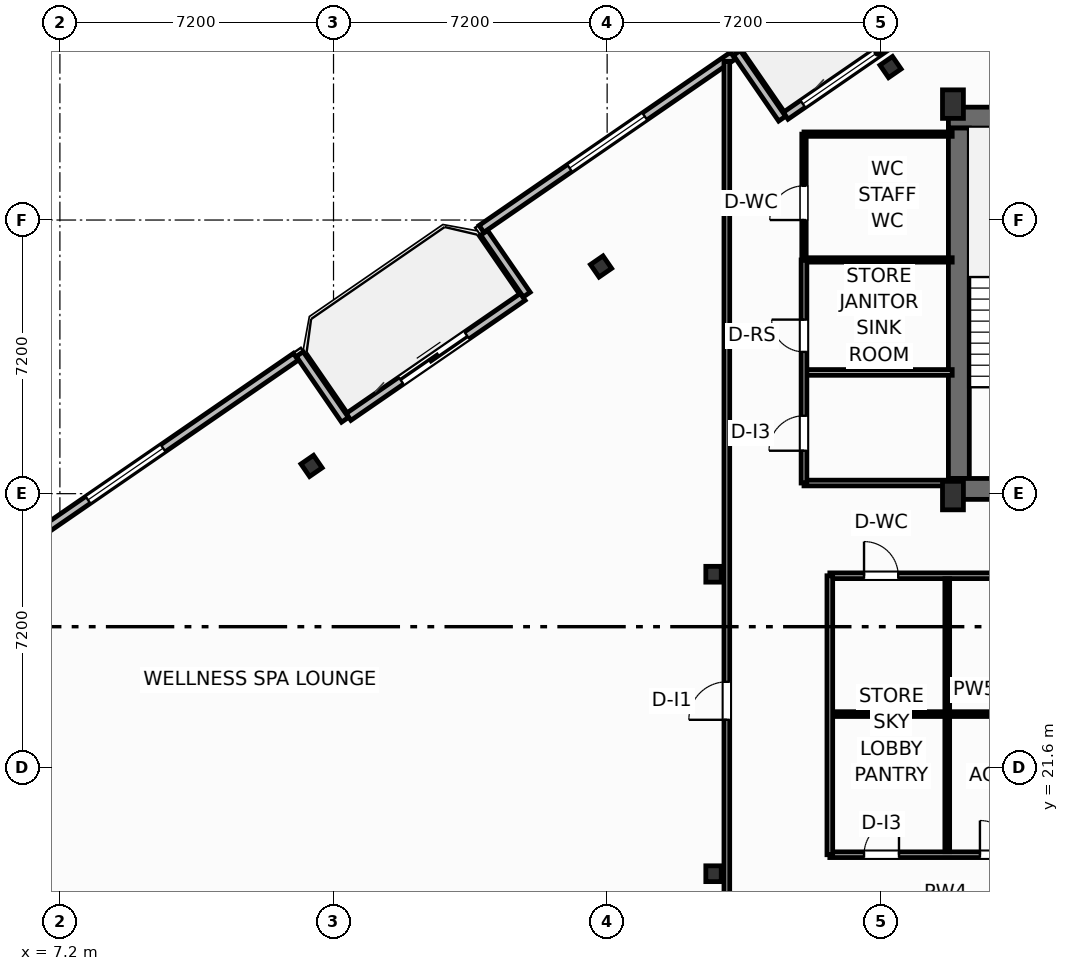
"""IFC4 building model, lengths in metres.
Left out: names, types, materials, properties, quantities, classifications, styles, units other than length and angle.
Written with IfcOpenShell. Run it as: python <this file> out.ifc"""

import sys

from ifc_helpers import new_model, si_unit, direction, frame, frame_2d, origin, origin_2d, place, context, subcontext, project, spatial, rectangle, i_section, extrude, element, fill, save


model = new_model("IFC4")
c1 = context("Model", 3, precision=1e-05, world=origin(), true_north=direction((0.0, 1.0)))
c2 = subcontext(c1, "Body", "Model", "MODEL_VIEW")
j1 = project(units=[si_unit("LENGTHUNIT", "METRE"), si_unit("PLANEANGLEUNIT", "RADIAN")], contexts=[c1])
p1 = place(None, origin())
s1 = spatial("IfcSite", under=j1, at=p1, CompositionType="ELEMENT")
p2 = place(p1, origin())
s2 = spatial("IfcBuilding", under=s1, at=p2, CompositionType="ELEMENT")
p3 = place(p2, frame((0.0, 0.0, 284.1)))
s3 = spatial("IfcBuildingStorey", under=s2, at=p3, CompositionType="ELEMENT", Elevation=284.1)
for number, where, z_axis, x_axis in (
    (1, (30.7, 28.75, 0.0), (0.0, 0.0, 1.0), (1.0, 0.0, 0.0)),
    (2, (30.7, 39.05, 0.0), (0.0, 0.0, 1.0), (1.0, 0.0, 0.0)),
):
    element("IfcColumn", number, at=place(p3, frame(where, z_axis=z_axis, x_axis=x_axis)), inside=s3, PredefinedType="COLUMN", context=c2, shape_type="SweptSolid", body=[
        extrude(rectangle(XDim=0.55, YDim=0.75, at=origin_2d()), origin(), (0.0, 0.0, 1.0), 3.7),
    ])
for number, where, z_axis, x_axis in (
    (3, (24.4, 18.8, 0.0), (0.0, 0.0, 1.0), (1.0, 0.0, 0.0)),
    (4, (24.4, 26.68, 0.0), (0.0, 0.0, 1.0), (1.0, 0.0, 0.0)),
):
    element("IfcColumn", number, at=place(p3, frame(where, z_axis=z_axis, x_axis=x_axis)), inside=s3, PredefinedType="COLUMN", context=c2, shape_type="SweptSolid", body=[
        extrude(i_section(OverallWidth=0.406, OverallDepth=0.416, WebThickness=0.03, FlangeThickness=0.048, FilletRadius=0.025, at=origin_2d()), origin(), (0.0, 0.0, 1.0), 3.7),
    ])
p4 = place(p3, frame((30.58, 38.695, 0.0), z_axis=(0.0, 0.0, 1.0), x_axis=(1.0, 0.0, 0.0)))
e5 = element("IfcWall", 5, at=p4, inside=s3, PredefinedType="SHEAR", context=c2, shape_type="SweptSolid", body=[
    extrude(rectangle(XDim=17.24, YDim=0.55, at=frame_2d((8.62, 0.0))), origin(), (0.0, 0.0, 1.0), 3.45),
])
p5 = place(p3, frame((30.855, 29.2, 0.0), z_axis=(0.0, 0.0, 1.0), x_axis=(0.0, 1.0, 0.0)))
e6 = element("IfcWall", 6, at=p5, inside=s3, PredefinedType="SHEAR", context=c2, shape_type="SweptSolid", body=[
    extrude(rectangle(XDim=9.22, YDim=0.55, at=frame_2d((4.61, 0.0))), origin(), (0.0, 0.0, 1.0), 3.45),
])
p6 = place(p3, frame((30.58, 28.925, 0.0), z_axis=(0.0, 0.0, 1.0), x_axis=(1.0, 0.0, 0.0)))
e7 = element("IfcWall", 7, at=p6, inside=s3, PredefinedType="SHEAR", context=c2, shape_type="SweptSolid", body=[
    extrude(rectangle(XDim=4.22, YDim=0.55, at=frame_2d((2.11, 0.0))), origin(), (0.0, 0.0, 1.0), 3.45),
])
for number, where, z_axis, x_axis in (
    (8, (29.057, 40.025, 0.0), (0.0, 0.0, 1.0), (0.824, 0.567, 0.0)),
    (9, (21.44, 34.778, 0.0), (0.0, 0.0, 1.0), (0.824, 0.567, 0.0)),
    (10, (13.822, 29.53, 0.0), (0.0, 0.0, 1.0), (0.824, 0.567, 0.0)),
):
    element("IfcColumn", number, at=place(p3, frame(where, z_axis=z_axis, x_axis=x_axis)), inside=s3, PredefinedType="COLUMN", context=c2, shape_type="SweptSolid", body=[
        extrude(i_section(OverallWidth=0.401, OverallDepth=0.399, WebThickness=0.025, FlangeThickness=0.04, FilletRadius=0.022, at=origin_2d()), origin(), (0.0, 0.0, 1.0), 3.7),
    ])
p7 = place(p3, frame((14.795, 30.82, 0.0), z_axis=(0.0, 0.0, 1.0), x_axis=(0.823541290762, 0.567256328665, 0.0)))
e11 = element("IfcWall", 11, at=p7, inside=s3, PredefinedType="SOLIDWALL", context=c2, shape_type="SweptSolid", body=[
    extrude(rectangle(XDim=5.567, YDim=0.22, at=frame_2d((2.784, 0.0))), origin(), (0.0, 0.0, 1.0), 2.73),
])
p8 = place(p7, frame((1.68, 0.0, 0.0)))
e12 = element("IfcOpeningElement", 12, at=p8, cuts=e11, PredefinedType="OPENING", context=c2, shape_type="SweptSolid", body=[
    extrude(rectangle(XDim=2.1, YDim=2.3, at=frame_2d((1.05, 1.15))), frame((0.0, 0.12, 0.0), z_axis=(0.0, -1.0, 0.0), x_axis=(1.0, 0.0, 0.0)), (0.0, 0.0, 1.0), 0.24),
])
p9 = place(p3, frame((26.297, 38.743, 0.0), z_axis=(0.0, 0.0, 1.0), x_axis=(0.823534636215, 0.567265989598, 0.0)))
e13 = element("IfcWall", 13, at=p9, inside=s3, PredefinedType="SOLIDWALL", context=c2, shape_type="SweptSolid", body=[
    extrude(rectangle(XDim=6.0, YDim=0.22, at=frame_2d((3.0, 0.0))), origin(), (0.0, 0.0, 1.0), 2.73),
])
p10 = place(p9, frame((3.5, 0.0, 0.0)))
e14 = element("IfcOpeningElement", 14, at=p10, cuts=e13, PredefinedType="OPENING", context=c2, shape_type="SweptSolid", body=[
    extrude(rectangle(XDim=2.1, YDim=2.3, at=frame_2d((1.05, 1.15))), frame((0.0, 0.12, 0.0), z_axis=(0.0, -1.0, 0.0), x_axis=(1.0, 0.0, 0.0)), (0.0, 0.0, 1.0), 0.24),
])
p11 = place(p9, frame((0.55, 0.0, 0.75)))
e15 = element("IfcOpeningElement", 15, at=p11, cuts=e13, PredefinedType="OPENING", context=c2, shape_type="SweptSolid", body=[
    extrude(rectangle(XDim=2.4, YDim=1.85, at=frame_2d((1.2, 0.925))), frame((0.0, 0.12, 0.0), z_axis=(0.0, -1.0, 0.0), x_axis=(1.0, 0.0, 0.0)), (0.0, 0.0, 1.0), 0.24),
])
p12 = place(p3, frame((26.204, 38.667, 0.0), z_axis=(0.0, 0.0, 1.0), x_axis=(-0.567219383419, 0.823566737474, 0.0)))
e16 = element("IfcWall", 16, at=p12, inside=s3, PredefinedType="SOLIDWALL", context=c2, shape_type="SweptSolid", body=[
    extrude(rectangle(XDim=2.1, YDim=0.22, at=frame_2d((1.05, 0.0))), origin(), (0.0, 0.0, 1.0), 2.73),
])
p13 = place(p3, frame((24.91, 40.325, 0.0), z_axis=(0.0, 0.0, 1.0), x_axis=(-0.823521165086, -0.56728554596, 0.0)))
e17 = element("IfcWall", 17, at=p13, inside=s3, PredefinedType="SOLIDWALL", context=c2, shape_type="SweptSolid", body=[
    extrude(rectangle(XDim=8.035, YDim=0.22, at=frame_2d((4.018, 0.0))), origin(), (0.0, 0.0, 1.0), 2.73),
])
p14 = place(p13, frame((2.817, 0.0, 0.8)))
e18 = element("IfcOpeningElement", 18, at=p14, cuts=e17, PredefinedType="OPENING", context=c2, shape_type="SweptSolid", body=[
    extrude(rectangle(XDim=2.4, YDim=1.85, at=frame_2d((1.2, 0.925))), frame((0.0, 0.12, 0.0), z_axis=(0.0, -1.0, 0.0), x_axis=(1.0, 0.0, 0.0)), (0.0, 0.0, 1.0), 0.24),
])
p15 = place(p3, frame((18.364, 35.664, 0.0), z_axis=(0.0, 0.0, 1.0), x_axis=(0.567215821234, -0.823569190865, 0.0)))
e19 = element("IfcWall", 19, at=p15, inside=s3, PredefinedType="SOLIDWALL", context=c2, shape_type="SweptSolid", body=[
    extrude(rectangle(XDim=1.975, YDim=0.22, at=frame_2d((0.988, 0.0))), origin(), (0.0, 0.0, 1.0), 2.73),
])
p16 = place(p3, frame((14.702, 30.744, 0.0), z_axis=(0.0, 0.0, 1.0), x_axis=(-0.567352541689, 0.823475010816, 0.0)))
e20 = element("IfcWall", 20, at=p16, inside=s3, PredefinedType="SOLIDWALL", context=c2, shape_type="SweptSolid", body=[
    extrude(rectangle(XDim=2.1, YDim=0.22, at=frame_2d((1.05, 0.0))), origin(), (0.0, 0.0, 1.0), 2.73),
])
p17 = place(p3, frame((13.408, 32.402, 0.0), z_axis=(0.0, 0.0, 1.0), x_axis=(-0.823527634633, -0.567276154087, 0.0)))
e21 = element("IfcWall", 21, at=p17, inside=s3, PredefinedType="SOLIDWALL", context=c2, shape_type="SweptSolid", body=[
    extrude(rectangle(XDim=10.88, YDim=0.22, at=frame_2d((5.44, 0.0))), origin(), (0.0, 0.0, 1.0), 2.73),
])
p18 = place(p17, frame((4.24, 0.0, 0.8)))
e22 = element("IfcOpeningElement", 22, at=p18, cuts=e21, PredefinedType="OPENING", context=c2, shape_type="SweptSolid", body=[
    extrude(rectangle(XDim=2.4, YDim=1.85, at=frame_2d((1.2, 0.925))), frame((0.0, 0.12, 0.0), z_axis=(0.0, -1.0, 0.0), x_axis=(1.0, 0.0, 0.0)), (0.0, 0.0, 1.0), 0.24),
])
p19 = place(p3, frame((27.46, 26.64, 0.0), z_axis=(0.0, 0.0, 1.0), x_axis=(1.0, 0.0, 0.0)))
e23 = element("IfcWall", 23, at=p19, inside=s3, PredefinedType="PARTITIONING", context=c2, shape_type="SweptSolid", body=[
    extrude(rectangle(XDim=6.1, YDim=0.15, at=frame_2d((3.05, 0.0))), origin(), (0.0, 0.0, 1.0), 2.662),
])
p20 = place(p19, frame((0.9, 0.0, 0.0)))
e24 = element("IfcOpeningElement", 24, at=p20, cuts=e23, PredefinedType="OPENING", context=c2, shape_type="SweptSolid", body=[
    extrude(rectangle(XDim=0.9, YDim=2.05, at=frame_2d((0.45, 1.025))), frame((0.0, 0.085, 0.0), z_axis=(0.0, -1.0, 0.0), x_axis=(1.0, 0.0, 0.0)), (0.0, 0.0, 1.0), 0.17),
])
p21 = place(p19, frame((4.303, 0.0, 0.0)))
e25 = element("IfcOpeningElement", 25, at=p21, cuts=e23, PredefinedType="OPENING", context=c2, shape_type="SweptSolid", body=[
    extrude(rectangle(XDim=0.9, YDim=2.05, at=frame_2d((0.45, 1.025))), frame((0.0, 0.085, 0.0), z_axis=(0.0, -1.0, 0.0), x_axis=(1.0, 0.0, 0.0)), (0.0, 0.0, 1.0), 0.17),
])
p22 = place(p3, frame((27.46, 19.3, 0.0), z_axis=(0.0, 0.0, 1.0), x_axis=(1.0, 0.0, 0.0)))
e26 = element("IfcWall", 26, at=p22, inside=s3, PredefinedType="PARTITIONING", context=c2, shape_type="SweptSolid", body=[
    extrude(rectangle(XDim=6.1, YDim=0.15, at=frame_2d((3.05, 0.0))), origin(), (0.0, 0.0, 1.0), 2.662),
])
p23 = place(p22, frame((0.9, 0.0, 0.0)))
e27 = element("IfcOpeningElement", 27, at=p23, cuts=e26, PredefinedType="OPENING", context=c2, shape_type="SweptSolid", body=[
    extrude(rectangle(XDim=0.92, YDim=2.05, at=frame_2d((0.46, 1.025))), frame((0.0, 0.085, 0.0), z_axis=(0.0, -1.0, 0.0), x_axis=(1.0, 0.0, 0.0)), (0.0, 0.0, 1.0), 0.17),
])
p24 = place(p22, frame((3.95, 0.0, 0.0)))
e28 = element("IfcOpeningElement", 28, at=p24, cuts=e26, PredefinedType="OPENING", context=c2, shape_type="SweptSolid", body=[
    extrude(rectangle(XDim=0.9, YDim=2.05, at=frame_2d((0.45, 1.025))), frame((0.0, 0.085, 0.0), z_axis=(0.0, -1.0, 0.0), x_axis=(1.0, 0.0, 0.0)), (0.0, 0.0, 1.0), 0.17),
])
p25 = place(p3, frame((30.55, 19.38, 0.0), z_axis=(0.0, 0.0, 1.0), x_axis=(0.0, 1.0, 0.0)))
e29 = element("IfcWall", 29, at=p25, inside=s3, PredefinedType="PARTITIONING", context=c2, shape_type="SweptSolid", body=[
    extrude(rectangle(XDim=7.18, YDim=0.125, at=frame_2d((3.59, 0.0))), origin(), (0.0, 0.0, 1.0), 3.45),
])
p26 = place(p3, frame((27.52, 23.0, 0.0), z_axis=(0.0, 0.0, 1.0), x_axis=(1.0, 0.0, 0.0)))
e30 = element("IfcWall", 30, at=p26, inside=s3, PredefinedType="PARTITIONING", context=c2, shape_type="SweptSolid", body=[
    extrude(rectangle(XDim=6.0, YDim=0.125, at=frame_2d((3.0, 0.0))), origin(), (0.0, 0.0, 1.0), 3.45),
])
p27 = place(p3, frame((27.46, 19.3, 0.0), z_axis=(0.0, 0.0, 1.0), x_axis=(0.0, 1.0, 0.0)))
e31 = element("IfcWall", 31, at=p27, inside=s3, PredefinedType="PARTITIONING", context=c2, shape_type="SweptSolid", body=[
    extrude(rectangle(XDim=7.34, YDim=0.15, at=frame_2d((3.67, 0.0))), origin(), (0.0, 0.0, 1.0), 3.45),
])
p28 = place(p3, frame((24.75, 16.85, 0.0), z_axis=(0.0, 0.0, 1.0), x_axis=(0.0, 1.0, 0.0)))
e32 = element("IfcWall", 32, at=p28, inside=s3, PredefinedType="PARTITIONING", context=c2, shape_type="SweptSolid", body=[
    extrude(rectangle(XDim=23.325, YDim=0.15, at=frame_2d((11.663, 0.0))), origin(), (0.0, 0.0, 1.0), 3.45),
])
p29 = place(p28, frame((6.0, 0.0, 0.0)))
e33 = element("IfcOpeningElement", 33, at=p29, cuts=e32, PredefinedType="OPENING", context=c2, shape_type="SweptSolid", body=[
    extrude(rectangle(XDim=1.0, YDim=2.05, at=frame_2d((0.5, 1.025))), frame((0.0, 0.085, 0.0), z_axis=(0.0, -1.0, 0.0), x_axis=(1.0, 0.0, 0.0)), (0.0, 0.0, 1.0), 0.17),
])
p30 = place(p3, frame((26.78, 29.08, 0.0), z_axis=(0.0, 0.0, 1.0), x_axis=(1.0, 0.0, 0.0)))
e34 = element("IfcWall", 34, at=p30, inside=s3, PredefinedType="PARTITIONING", context=c2, shape_type="SweptSolid", body=[
    extrude(rectangle(XDim=3.8, YDim=0.15, at=frame_2d((1.9, 0.0))), origin(), (0.0, 0.0, 1.0), 3.45),
])
p31 = place(p3, frame((26.8, 31.99, 0.0), z_axis=(0.0, 0.0, 1.0), x_axis=(1.0, 0.0, 0.0)))
e35 = element("IfcWall", 35, at=p31, inside=s3, PredefinedType="PARTITIONING", context=c2, shape_type="SweptSolid", body=[
    extrude(rectangle(XDim=3.88, YDim=0.15, at=frame_2d((1.94, 0.0))), origin(), (0.0, 0.0, 1.0), 3.45),
])
p32 = place(p3, frame((26.8, 34.95, 0.0), z_axis=(0.0, 0.0, 1.0), x_axis=(1.0, 0.0, 0.0)))
e36 = element("IfcWall", 36, at=p32, inside=s3, PredefinedType="PARTITIONING", context=c2, shape_type="SweptSolid", body=[
    extrude(rectangle(XDim=3.88, YDim=0.115, at=frame_2d((1.94, 0.0))), origin(), (0.0, 0.0, 1.0), 3.45),
])
p33 = place(p3, frame((26.78, 38.26, 0.0), z_axis=(0.0, 0.0, 1.0), x_axis=(1.0, 0.0, 0.0)))
e37 = element("IfcWall", 37, at=p33, inside=s3, PredefinedType="PARTITIONING", context=c2, shape_type="SweptSolid", body=[
    extrude(rectangle(XDim=3.9, YDim=0.115, at=frame_2d((1.95, 0.0))), origin(), (0.0, 0.0, 1.0), 3.45),
])
p34 = place(p3, frame((26.78, 29.08, 0.0), z_axis=(0.0, 0.0, 1.0), x_axis=(0.0, 1.0, 0.0)))
e38 = element("IfcWall", 38, at=p34, inside=s3, PredefinedType="PARTITIONING", context=c2, shape_type="SweptSolid", body=[
    extrude(rectangle(XDim=5.87, YDim=0.15, at=frame_2d((2.935, 0.0))), origin(), (0.0, 0.0, 1.0), 3.45),
])
p35 = place(p34, frame((0.85, 0.0, 0.0)))
e39 = element("IfcOpeningElement", 39, at=p35, cuts=e38, PredefinedType="OPENING", context=c2, shape_type="SweptSolid", body=[
    extrude(rectangle(XDim=0.92, YDim=2.05, at=frame_2d((0.46, 1.025))), frame((0.0, 0.085, 0.0), z_axis=(0.0, -1.0, 0.0), x_axis=(1.0, 0.0, 0.0)), (0.0, 0.0, 1.0), 0.17),
])
p36 = place(p34, frame((3.45, 0.0, 0.0)))
e40 = element("IfcOpeningElement", 40, at=p36, cuts=e38, PredefinedType="OPENING", context=c2, shape_type="SweptSolid", body=[
    extrude(rectangle(XDim=0.85, YDim=2.05, at=frame_2d((0.425, 1.025))), frame((0.0, 0.085, 0.0), z_axis=(0.0, -1.0, 0.0), x_axis=(1.0, 0.0, 0.0)), (0.0, 0.0, 1.0), 0.17),
])
p37 = place(p3, frame((26.78, 34.95, 0.0), z_axis=(0.0, 0.0, 1.0), x_axis=(0.0, 1.0, 0.0)))
e41 = element("IfcWall", 41, at=p37, inside=s3, PredefinedType="PARTITIONING", context=c2, shape_type="SweptSolid", body=[
    extrude(rectangle(XDim=3.31, YDim=0.115, at=frame_2d((1.655, 0.0))), origin(), (0.0, 0.0, 1.0), 3.45),
])
p38 = place(p37, frame((1.05, 0.0, 0.0)))
e42 = element("IfcOpeningElement", 42, at=p38, cuts=e41, PredefinedType="OPENING", context=c2, shape_type="SweptSolid", body=[
    extrude(rectangle(XDim=0.9, YDim=2.05, at=frame_2d((0.45, 1.025))), frame((0.0, 0.067, 0.0), z_axis=(0.0, -1.0, 0.0), x_axis=(1.0, 0.0, 0.0)), (0.0, 0.0, 1.0), 0.135),
])
p39 = place(p8, origin())
e43 = element("IfcDoor", 43, at=p39, inside=s3, OperationType="SLIDING_TO_LEFT", PredefinedType="DOOR", context=c2, shape_type="SweptSolid", body=[
    extrude(rectangle(XDim=2.1, YDim=2.3, at=frame_2d((1.05, 1.15))), frame((0.0, 0.025, 0.0), z_axis=(0.0, -1.0, 0.0), x_axis=(1.0, 0.0, 0.0)), (0.0, 0.0, 1.0), 0.05),
])
fill(e12, e43)
p40 = place(p11, origin())
e44 = element("IfcWindow", 44, at=p40, inside=s3, PartitioningType="SINGLE_PANEL", PredefinedType="WINDOW", context=c2, shape_type="SweptSolid", body=[
    extrude(rectangle(XDim=2.4, YDim=1.85, at=frame_2d((1.2, 0.925))), frame((0.0, 0.03, 0.0), z_axis=(0.0, -1.0, 0.0), x_axis=(1.0, 0.0, 0.0)), (0.0, 0.0, 1.0), 0.06),
])
fill(e15, e44)
p41 = place(p14, origin())
e45 = element("IfcWindow", 45, at=p41, inside=s3, PartitioningType="SINGLE_PANEL", PredefinedType="WINDOW", context=c2, shape_type="SweptSolid", body=[
    extrude(rectangle(XDim=2.4, YDim=1.85, at=frame_2d((1.2, 0.925))), frame((0.0, 0.03, 0.0), z_axis=(0.0, -1.0, 0.0), x_axis=(1.0, 0.0, 0.0)), (0.0, 0.0, 1.0), 0.06),
])
fill(e18, e45)
p42 = place(p18, origin())
e46 = element("IfcWindow", 46, at=p42, inside=s3, PartitioningType="SINGLE_PANEL", PredefinedType="WINDOW", context=c2, shape_type="SweptSolid", body=[
    extrude(rectangle(XDim=2.4, YDim=1.85, at=frame_2d((1.2, 0.925))), frame((0.0, 0.03, 0.0), z_axis=(0.0, -1.0, 0.0), x_axis=(1.0, 0.0, 0.0)), (0.0, 0.0, 1.0), 0.06),
])
fill(e22, e46)
p43 = place(p20, origin())
e47 = element("IfcDoor", 47, at=p43, inside=s3, OperationType="SINGLE_SWING_LEFT", PredefinedType="DOOR", context=c2, shape_type="SweptSolid", body=[
    extrude(rectangle(XDim=0.9, YDim=2.05, at=frame_2d((0.45, 1.025))), frame((0.0, 0.025, 0.0), z_axis=(0.0, -1.0, 0.0), x_axis=(1.0, 0.0, 0.0)), (0.0, 0.0, 1.0), 0.05),
])
fill(e24, e47)
p44 = place(p23, origin())
e48 = element("IfcDoor", 48, at=p44, inside=s3, OperationType="SINGLE_SWING_RIGHT", PredefinedType="DOOR", context=c2, shape_type="SweptSolid", body=[
    extrude(rectangle(XDim=0.92, YDim=2.05, at=frame_2d((0.46, 1.025))), frame((0.0, 0.025, 0.0), z_axis=(0.0, -1.0, 0.0), x_axis=(1.0, 0.0, 0.0)), (0.0, 0.0, 1.0), 0.05),
])
fill(e27, e48)
p45 = place(p24, origin())
e49 = element("IfcDoor", 49, at=p45, inside=s3, OperationType="SINGLE_SWING_LEFT", PredefinedType="DOOR", context=c2, shape_type="SweptSolid", body=[
    extrude(rectangle(XDim=0.9, YDim=2.05, at=frame_2d((0.45, 1.025))), frame((0.0, 0.025, 0.0), z_axis=(0.0, -1.0, 0.0), x_axis=(1.0, 0.0, 0.0)), (0.0, 0.0, 1.0), 0.05),
])
fill(e28, e49)
p46 = place(p29, origin())
e50 = element("IfcDoor", 50, at=p46, inside=s3, OperationType="SINGLE_SWING_LEFT", PredefinedType="DOOR", context=c2, shape_type="SweptSolid", body=[
    extrude(rectangle(XDim=1.0, YDim=2.05, at=frame_2d((0.5, 1.025))), frame((0.0, 0.025, 0.0), z_axis=(0.0, -1.0, 0.0), x_axis=(1.0, 0.0, 0.0)), (0.0, 0.0, 1.0), 0.05),
])
fill(e33, e50)
p47 = place(p35, origin())
e51 = element("IfcDoor", 51, at=p47, inside=s3, OperationType="SINGLE_SWING_LEFT", PredefinedType="DOOR", context=c2, shape_type="SweptSolid", body=[
    extrude(rectangle(XDim=0.92, YDim=2.05, at=frame_2d((0.46, 1.025))), frame((0.0, 0.025, 0.0), z_axis=(0.0, -1.0, 0.0), x_axis=(1.0, 0.0, 0.0)), (0.0, 0.0, 1.0), 0.05),
])
fill(e39, e51)
p48 = place(p36, origin())
e52 = element("IfcDoor", 52, at=p48, inside=s3, OperationType="SINGLE_SWING_RIGHT", PredefinedType="DOOR", context=c2, shape_type="SweptSolid", body=[
    extrude(rectangle(XDim=0.85, YDim=2.05, at=frame_2d((0.425, 1.025))), frame((0.0, 0.025, 0.0), z_axis=(0.0, -1.0, 0.0), x_axis=(1.0, 0.0, 0.0)), (0.0, 0.0, 1.0), 0.05),
])
fill(e40, e52)
p49 = place(p38, origin())
e53 = element("IfcDoor", 53, at=p49, inside=s3, OperationType="SINGLE_SWING_LEFT", PredefinedType="DOOR", context=c2, shape_type="SweptSolid", body=[
    extrude(rectangle(XDim=0.9, YDim=2.05, at=frame_2d((0.45, 1.025))), frame((0.0, 0.025, 0.0), z_axis=(0.0, -1.0, 0.0), x_axis=(1.0, 0.0, 0.0)), (0.0, 0.0, 1.0), 0.05),
])
fill(e42, e53)
save(model, sys.argv[1])
